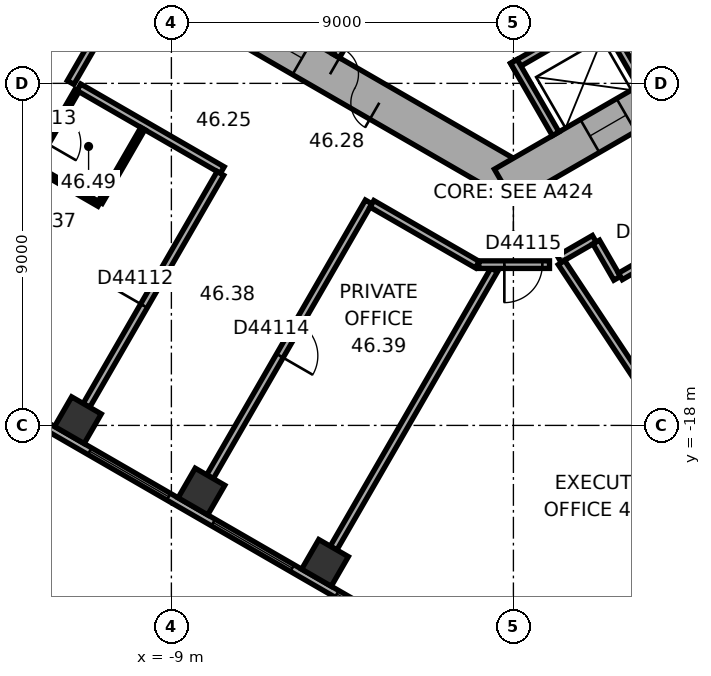
"""IFC4 building model, lengths in metres.
Left out: names, types, materials, properties, quantities, classifications, styles, units other than length and angle.
Written with IfcOpenShell. Run it as: python <this file> out.ifc"""

import sys

from ifc_helpers import new_model, si_unit, direction, frame, frame_2d, origin, origin_2d, place, context, subcontext, project, spatial, rectangle, extrude, element, fill, save


model = new_model("IFC4")
c1 = context("Model", 3, precision=1e-05, world=origin(), true_north=direction((0.0, 1.0)))
c2 = subcontext(c1, "Body", "Model", "MODEL_VIEW")
j1 = project(units=[si_unit("LENGTHUNIT", "METRE"), si_unit("PLANEANGLEUNIT", "RADIAN")], contexts=[c1])
p1 = place(None, origin())
s1 = spatial("IfcSite", under=j1, at=p1, CompositionType="ELEMENT")
p2 = place(p1, origin())
s2 = spatial("IfcBuilding", under=s1, at=p2, CompositionType="ELEMENT")
p3 = place(p2, frame((0.0, 0.0, 187.3)))
s3 = spatial("IfcBuildingStorey", under=s2, at=p3, CompositionType="ELEMENT", Elevation=187.3)
for number, where, z_axis, x_axis in (
    (1, (-11.46, -17.863, 0.0), (0.0, 0.0, 1.0), (0.866, -0.5, 0.0)),
    (2, (-8.208, -19.74, 0.0), (0.0, 0.0, 1.0), (0.866, -0.5, 0.0)),
    (3, (-4.958, -21.617, 0.0), (0.0, 0.0, 1.0), (0.866, -0.5, 0.0)),
):
    element("IfcColumn", number, at=place(p3, frame(where, z_axis=z_axis, x_axis=x_axis)), inside=s3, PredefinedType="COLUMN", context=c2, shape_type="SweptSolid", body=[
        extrude(rectangle(XDim=0.9, YDim=0.9, at=origin_2d()), origin(), (0.0, 0.0, 1.0), 3.7),
    ])
p4 = place(p3, frame((-10.25, -5.629, 0.0), z_axis=(0.0, 0.0, 1.0), x_axis=(0.866022616891, -0.50000482701, 0.0)))
e4 = element("IfcWall", 4, at=p4, inside=s3, PredefinedType="SHEAR", context=c2, shape_type="SweptSolid", body=[
    extrude(rectangle(XDim=12.125, YDim=1.0, at=frame_2d((6.062, 0.0))), origin(), (0.0, 0.0, 1.0), 3.7),
])
p5 = place(p4, frame((6.262, 0.0, 0.0)))
e5 = element("IfcOpeningElement", 5, at=p5, cuts=e4, PredefinedType="OPENING", context=c2, shape_type="SweptSolid", body=[
    extrude(rectangle(XDim=1.5, YDim=2.1, at=frame_2d((0.75, 1.05))), frame((0.0, 0.51, 0.0), z_axis=(0.0, -1.0, 0.0), x_axis=(1.0, 0.0, 0.0)), (0.0, 0.0, 1.0), 1.02),
])
p6 = place(p4, frame((1.712, 0.0, 0.0)))
e6 = element("IfcOpeningElement", 6, at=p6, cuts=e4, PredefinedType="OPENING", context=c2, shape_type="SweptSolid", body=[
    extrude(rectangle(XDim=1.1, YDim=2.1, at=frame_2d((0.55, 1.05))), frame((0.0, 0.51, 0.0), z_axis=(0.0, -1.0, 0.0), x_axis=(1.0, 0.0, 0.0)), (0.0, 0.0, 1.0), 1.02),
])
p7 = place(p4, frame((4.312, 0.0, 0.0)))
e7 = element("IfcOpeningElement", 7, at=p7, cuts=e4, PredefinedType="OPENING", context=c2, shape_type="SweptSolid", body=[
    extrude(rectangle(XDim=1.1, YDim=2.1, at=frame_2d((0.55, 1.05))), frame((0.0, 0.51, 0.0), z_axis=(0.0, -1.0, 0.0), x_axis=(1.0, 0.0, 0.0)), (0.0, 0.0, 1.0), 1.02),
])
p8 = place(p3, frame((-0.25, -11.691, 0.0), z_axis=(0.0, 0.0, 1.0), x_axis=(0.866022616891, 0.50000482701, 0.0)))
e8 = element("IfcWall", 8, at=p8, inside=s3, PredefinedType="SHEAR", context=c2, shape_type="SweptSolid", body=[
    extrude(rectangle(XDim=12.125, YDim=1.0, at=frame_2d((6.062, 0.0))), origin(), (0.0, 0.0, 1.0), 3.7),
])
p9 = place(p8, frame((2.612, 0.0, 0.0)))
e9 = element("IfcOpeningElement", 9, at=p9, cuts=e8, PredefinedType="OPENING", context=c2, shape_type="SweptSolid", body=[
    extrude(rectangle(XDim=1.1, YDim=2.1, at=frame_2d((0.55, 1.05))), frame((0.0, 0.51, 0.0), z_axis=(0.0, -1.0, 0.0), x_axis=(1.0, 0.0, 0.0)), (0.0, 0.0, 1.0), 1.02),
])
p10 = place(p8, frame((5.212, 0.0, 0.0)))
e10 = element("IfcOpeningElement", 10, at=p10, cuts=e8, PredefinedType="OPENING", context=c2, shape_type="SweptSolid", body=[
    extrude(rectangle(XDim=1.1, YDim=2.1, at=frame_2d((0.55, 1.05))), frame((0.0, 0.51, 0.0), z_axis=(0.0, -1.0, 0.0), x_axis=(1.0, 0.0, 0.0)), (0.0, 0.0, 1.0), 1.02),
])
p11 = place(p8, frame((7.812, 0.0, 0.0)))
e11 = element("IfcOpeningElement", 11, at=p11, cuts=e8, PredefinedType="OPENING", context=c2, shape_type="SweptSolid", body=[
    extrude(rectangle(XDim=1.1, YDim=2.1, at=frame_2d((0.55, 1.05))), frame((0.0, 0.51, 0.0), z_axis=(0.0, -1.0, 0.0), x_axis=(1.0, 0.0, 0.0)), (0.0, 0.0, 1.0), 1.02),
])
p12 = place(p3, frame((-18.789, -14.267, 0.0), z_axis=(0.0, 0.0, 1.0), x_axis=(0.866023315909, -0.500003616288, 0.0)))
e12 = element("IfcWall", 12, at=p12, inside=s3, PredefinedType="STANDARD", context=c2, shape_type="SweptSolid", body=[
    extrude(rectangle(XDim=20.044, YDim=0.2, at=frame_2d((10.022, 0.0))), origin(), (0.0, 0.0, 1.0), 3.7),
])
p13 = place(p12, frame((1.314, 0.0, 0.9)))
e13 = element("IfcOpeningElement", 13, at=p13, cuts=e12, PredefinedType="OPENING", context=c2, shape_type="SweptSolid", body=[
    extrude(rectangle(XDim=2.4, YDim=2.0, at=frame_2d((1.2, 1.0))), frame((0.0, 0.11, 0.0), z_axis=(0.0, -1.0, 0.0), x_axis=(1.0, 0.0, 0.0)), (0.0, 0.0, 1.0), 0.22),
])
p14 = place(p12, frame((5.069, 0.0, 0.9)))
e14 = element("IfcOpeningElement", 14, at=p14, cuts=e12, PredefinedType="OPENING", context=c2, shape_type="SweptSolid", body=[
    extrude(rectangle(XDim=2.4, YDim=2.0, at=frame_2d((1.2, 1.0))), frame((0.0, 0.11, 0.0), z_axis=(0.0, -1.0, 0.0), x_axis=(1.0, 0.0, 0.0)), (0.0, 0.0, 1.0), 0.22),
])
p15 = place(p12, frame((8.823, 0.0, 0.9)))
e15 = element("IfcOpeningElement", 15, at=p15, cuts=e12, PredefinedType="OPENING", context=c2, shape_type="SweptSolid", body=[
    extrude(rectangle(XDim=2.4, YDim=2.0, at=frame_2d((1.2, 1.0))), frame((0.0, 0.11, 0.0), z_axis=(0.0, -1.0, 0.0), x_axis=(1.0, 0.0, 0.0)), (0.0, 0.0, 1.0), 0.22),
])
p16 = place(p12, frame((12.577, 0.0, 0.9)))
e16 = element("IfcOpeningElement", 16, at=p16, cuts=e12, PredefinedType="OPENING", context=c2, shape_type="SweptSolid", body=[
    extrude(rectangle(XDim=2.4, YDim=2.0, at=frame_2d((1.2, 1.0))), frame((0.0, 0.11, 0.0), z_axis=(0.0, -1.0, 0.0), x_axis=(1.0, 0.0, 0.0)), (0.0, 0.0, 1.0), 0.22),
])
p17 = place(p12, frame((16.331, 0.0, 0.9)))
e17 = element("IfcOpeningElement", 17, at=p17, cuts=e12, PredefinedType="OPENING", context=c2, shape_type="SweptSolid", body=[
    extrude(rectangle(XDim=2.4, YDim=2.0, at=frame_2d((1.2, 1.0))), frame((0.0, 0.11, 0.0), z_axis=(0.0, -1.0, 0.0), x_axis=(1.0, 0.0, 0.0)), (0.0, 0.0, 1.0), 0.22),
])
p18 = place(p3, frame((2.911, -24.156, 0.0), z_axis=(0.0, 0.0, 1.0), x_axis=(0.833882163564, 0.551942512668, 0.0)))
e18 = element("IfcWall", 18, at=p18, inside=s3, PredefinedType="STANDARD", context=c2, shape_type="SweptSolid", body=[
    extrude(rectangle(XDim=20.044, YDim=0.2, at=frame_2d((10.022, 0.0))), origin(), (0.0, 0.0, 1.0), 3.7),
])
p19 = place(p18, frame((1.313, 0.0, 0.9)))
e19 = element("IfcOpeningElement", 19, at=p19, cuts=e18, PredefinedType="OPENING", context=c2, shape_type="SweptSolid", body=[
    extrude(rectangle(XDim=2.4, YDim=2.0, at=frame_2d((1.2, 1.0))), frame((0.0, 0.11, 0.0), z_axis=(0.0, -1.0, 0.0), x_axis=(1.0, 0.0, 0.0)), (0.0, 0.0, 1.0), 0.22),
])
p20 = place(p18, frame((5.067, 0.0, 0.9)))
e20 = element("IfcOpeningElement", 20, at=p20, cuts=e18, PredefinedType="OPENING", context=c2, shape_type="SweptSolid", body=[
    extrude(rectangle(XDim=2.4, YDim=2.0, at=frame_2d((1.2, 1.0))), frame((0.0, 0.11, 0.0), z_axis=(0.0, -1.0, 0.0), x_axis=(1.0, 0.0, 0.0)), (0.0, 0.0, 1.0), 0.22),
])
p21 = place(p18, frame((8.821, 0.0, 0.9)))
e21 = element("IfcOpeningElement", 21, at=p21, cuts=e18, PredefinedType="OPENING", context=c2, shape_type="SweptSolid", body=[
    extrude(rectangle(XDim=2.4, YDim=2.0, at=frame_2d((1.2, 1.0))), frame((0.0, 0.11, 0.0), z_axis=(0.0, -1.0, 0.0), x_axis=(1.0, 0.0, 0.0)), (0.0, 0.0, 1.0), 0.22),
])
p22 = place(p18, frame((12.575, 0.0, 0.9)))
e22 = element("IfcOpeningElement", 22, at=p22, cuts=e18, PredefinedType="OPENING", context=c2, shape_type="SweptSolid", body=[
    extrude(rectangle(XDim=2.4, YDim=2.0, at=frame_2d((1.2, 1.0))), frame((0.0, 0.11, 0.0), z_axis=(0.0, -1.0, 0.0), x_axis=(1.0, 0.0, 0.0)), (0.0, 0.0, 1.0), 0.22),
])
p23 = place(p18, frame((16.329, 0.0, 0.9)))
e23 = element("IfcOpeningElement", 23, at=p23, cuts=e18, PredefinedType="OPENING", context=c2, shape_type="SweptSolid", body=[
    extrude(rectangle(XDim=2.4, YDim=2.0, at=frame_2d((1.2, 1.0))), frame((0.0, 0.11, 0.0), z_axis=(0.0, -1.0, 0.0), x_axis=(1.0, 0.0, 0.0)), (0.0, 0.0, 1.0), 0.22),
])
p24 = place(p3, frame((-3.563, -6.372, 0.0), z_axis=(0.0, 0.0, 1.0), x_axis=(-0.499994660107, -0.866028486751, 0.0)))
e24 = element("IfcWall", 24, at=p24, inside=s3, PredefinedType="PARTITIONING", context=c2, shape_type="SweptSolid", body=[
    extrude(rectangle(XDim=2.2, YDim=0.2, at=frame_2d((1.1, 0.0))), origin(), (0.0, 0.0, 1.0), 3.42),
])
p25 = place(p3, frame((-0.024, -8.559, 0.0), z_axis=(0.0, 0.0, 1.0), x_axis=(0.866026010844, 0.49999894854, 0.0)))
e25 = element("IfcWall", 25, at=p25, inside=s3, PredefinedType="PARTITIONING", context=c2, shape_type="SweptSolid", body=[
    extrude(rectangle(XDim=8.0, YDim=0.2, at=frame_2d((4.0, 0.0))), origin(), (0.0, 0.0, 1.0), 3.42),
])
for number, where, z_axis, x_axis in (
    (26, (0.013, -8.422, 0.0), (0.0, 0.0, 1.0), (0.5, -0.866, 0.0)),
    (27, (2.264, -7.122, 0.0), (0.0, 0.0, 1.0), (0.5, -0.866, 0.0)),
):
    element("IfcWall", number, at=place(p3, frame(where, z_axis=z_axis, x_axis=x_axis)), inside=s3, PredefinedType="PARTITIONING", context=c2, shape_type="SweptSolid", body=[
        extrude(rectangle(XDim=2.2, YDim=0.2, at=frame_2d((1.1, 0.0))), origin(), (0.0, 0.0, 1.0), 3.42),
    ])
p26 = place(p3, frame((-12.635, -11.182, 0.0), z_axis=(0.0, 0.0, 1.0), x_axis=(0.499952165731, 0.866053019151, 0.0)))
e28 = element("IfcWall", 28, at=p26, inside=s3, PredefinedType="PARTITIONING", context=c2, shape_type="SweptSolid", body=[
    extrude(rectangle(XDim=2.3, YDim=0.12, at=frame_2d((1.15, 0.0))), origin(), (0.0, 0.0, 1.0), 3.42),
])
p27 = place(p26, frame((0.7, 0.0, 0.0)))
e29 = element("IfcOpeningElement", 29, at=p27, cuts=e28, PredefinedType="OPENING", context=c2, shape_type="SweptSolid", body=[
    extrude(rectangle(XDim=0.9, YDim=2.1, at=frame_2d((0.45, 1.05))), frame((0.0, 0.07, 0.0), z_axis=(0.0, -1.0, 0.0), x_axis=(1.0, 0.0, 0.0)), (0.0, 0.0, 1.0), 0.14),
])
p28 = place(p3, frame((-11.435, -9.103, 0.0), z_axis=(0.0, 0.0, 1.0), x_axis=(0.866007399799, -0.500031182522, 0.0)))
e30 = element("IfcWall", 30, at=p28, inside=s3, PredefinedType="PARTITIONING", context=c2, shape_type="SweptSolid", body=[
    extrude(rectangle(XDim=4.358, YDim=0.2, at=frame_2d((2.179, 0.0))), origin(), (0.0, 0.0, 1.0), 3.42),
])
p29 = place(p3, frame((-11.235, -17.474, 0.0), z_axis=(0.0, 0.0, 1.0), x_axis=(0.500009260695, 0.866020057054, 0.0)))
e31 = element("IfcWall", 31, at=p29, inside=s3, PredefinedType="PARTITIONING", context=c2, shape_type="SweptSolid", body=[
    extrude(rectangle(XDim=7.049, YDim=0.2, at=frame_2d((3.524, 0.0))), origin(), (0.0, 0.0, 1.0), 2.87),
])
p30 = place(p29, frame((3.024, 0.0, 0.0)))
e32 = element("IfcOpeningElement", 32, at=p30, cuts=e31, PredefinedType="OPENING", context=c2, shape_type="SweptSolid", body=[
    extrude(rectangle(XDim=1.0, YDim=2.1, at=frame_2d((0.5, 1.05))), frame((0.0, 0.11, 0.0), z_axis=(0.0, -1.0, 0.0), x_axis=(1.0, 0.0, 0.0)), (0.0, 0.0, 1.0), 0.22),
])
p31 = place(p3, frame((-11.101, -8.025, 0.0), z_axis=(0.0, 0.0, 1.0), x_axis=(-0.500074377092, -0.865982457891, 0.0)))
e33 = element("IfcWall", 33, at=p31, inside=s3, PredefinedType="PARTITIONING", context=c2, shape_type="SweptSolid", body=[
    extrude(rectangle(XDim=1.101, YDim=0.2, at=frame_2d((0.55, 0.0))), origin(), (0.0, 0.0, 1.0), 3.42),
])
p32 = place(p3, frame((-10.903, -12.182, 0.0), z_axis=(0.0, 0.0, 1.0), x_axis=(-0.866011626733, 0.500023861795, 0.0)))
e34 = element("IfcWall", 34, at=p32, inside=s3, PredefinedType="PARTITIONING", context=c2, shape_type="SweptSolid", body=[
    extrude(rectangle(XDim=1.94, YDim=0.12, at=frame_2d((0.97, 0.0))), origin(), (0.0, 0.0, 1.0), 3.42),
])
p33 = place(p3, frame((-9.753, -10.19, 0.0), z_axis=(0.0, 0.0, 1.0), x_axis=(-0.49994888933, -0.866054910533, 0.0)))
e35 = element("IfcWall", 35, at=p33, inside=s3, PredefinedType="PARTITIONING", context=c2, shape_type="SweptSolid", body=[
    extrude(rectangle(XDim=2.24, YDim=0.12, at=frame_2d((1.12, 0.0))), origin(), (0.0, 0.0, 1.0), 3.42),
])
p34 = place(p3, frame((-7.984, -19.351, 0.0), z_axis=(0.0, 0.0, 1.0), x_axis=(0.500010139422, 0.866019549707, 0.0)))
e36 = element("IfcWall", 36, at=p34, inside=s3, PredefinedType="PARTITIONING", context=c2, shape_type="SweptSolid", body=[
    extrude(rectangle(XDim=8.35, YDim=0.2, at=frame_2d((4.175, 0.0))), origin(), (0.0, 0.0, 1.0), 3.42),
])
p35 = place(p34, frame((3.675, 0.0, 0.0)))
e37 = element("IfcOpeningElement", 37, at=p35, cuts=e36, PredefinedType="OPENING", context=c2, shape_type="SweptSolid", body=[
    extrude(rectangle(XDim=1.0, YDim=2.1, at=frame_2d((0.5, 1.05))), frame((0.0, 0.11, 0.0), z_axis=(0.0, -1.0, 0.0), x_axis=(1.0, 0.0, 0.0)), (0.0, 0.0, 1.0), 0.22),
])
p36 = place(p3, frame((-4.732, -21.228, 0.0), z_axis=(0.0, 0.0, 1.0), x_axis=(0.500000843414, 0.866024916838, 0.0)))
e38 = element("IfcWall", 38, at=p36, inside=s3, PredefinedType="PARTITIONING", context=c2, shape_type="SweptSolid", body=[
    extrude(rectangle(XDim=8.452, YDim=0.2, at=frame_2d((4.226, 0.0))), origin(), (0.0, 0.0, 1.0), 3.42),
])
p37 = place(p3, frame((-3.722, -12.169, 0.0), z_axis=(0.0, 0.0, 1.0), x_axis=(0.866033163891, -0.499986558861, 0.0)))
e39 = element("IfcWall", 39, at=p37, inside=s3, PredefinedType="PARTITIONING", context=c2, shape_type="SweptSolid", body=[
    extrude(rectangle(XDim=3.201, YDim=0.2, at=frame_2d((1.6, 0.0))), origin(), (0.0, 0.0, 1.0), 3.42),
])
p38 = place(p3, frame((-0.91, -13.77, 0.0), z_axis=(0.0, 0.0, 1.0), x_axis=(1.0, 0.0, 0.0)))
e40 = element("IfcWall", 40, at=p38, inside=s3, PredefinedType="PARTITIONING", context=c2, shape_type="SweptSolid", body=[
    extrude(rectangle(XDim=1.86, YDim=0.2, at=frame_2d((0.93, 0.0))), origin(), (0.0, 0.0, 1.0), 3.42),
])
p39 = place(p38, frame((0.672, 0.0, 0.0)))
e41 = element("IfcOpeningElement", 41, at=p39, cuts=e40, PredefinedType="OPENING", context=c2, shape_type="SweptSolid", body=[
    extrude(rectangle(XDim=1.0, YDim=2.1, at=frame_2d((0.5, 1.05))), frame((0.0, 0.11, 0.0), z_axis=(0.0, -1.0, 0.0), x_axis=(1.0, 0.0, 0.0)), (0.0, 0.0, 1.0), 0.22),
])
p40 = place(p3, frame((1.204, -13.623, 0.0), z_axis=(0.0, 0.0, 1.0), x_axis=(0.866040989419, 0.499973003918, 0.0)))
e42 = element("IfcWall", 42, at=p40, inside=s3, PredefinedType="PARTITIONING", context=c2, shape_type="SweptSolid", body=[
    extrude(rectangle(XDim=1.068, YDim=0.2, at=frame_2d((0.534, 0.0))), origin(), (0.0, 0.0, 1.0), 3.42),
])
p41 = place(p3, frame((2.179, -13.176, 0.0), z_axis=(0.0, 0.0, 1.0), x_axis=(0.499978356969, -0.866037899034, 0.0)))
e43 = element("IfcWall", 43, at=p41, inside=s3, PredefinedType="PARTITIONING", context=c2, shape_type="SweptSolid", body=[
    extrude(rectangle(XDim=1.101, YDim=0.2, at=frame_2d((0.551, 0.0))), origin(), (0.0, 0.0, 1.0), 3.42),
])
p42 = place(p3, frame((2.816, -14.079, 0.0), z_axis=(0.0, 0.0, 1.0), x_axis=(0.866008705299, 0.50002892151, 0.0)))
e44 = element("IfcWall", 44, at=p42, inside=s3, PredefinedType="PARTITIONING", context=c2, shape_type="SweptSolid", body=[
    extrude(rectangle(XDim=2.666, YDim=0.2, at=frame_2d((1.333, 0.0))), origin(), (0.0, 0.0, 1.0), 3.42),
])
p43 = place(p42, frame((0.833, 0.0, 0.0)))
e45 = element("IfcOpeningElement", 45, at=p43, cuts=e44, PredefinedType="OPENING", context=c2, shape_type="SweptSolid", body=[
    extrude(rectangle(XDim=1.0, YDim=2.1, at=frame_2d((0.5, 1.05))), frame((0.0, 0.11, 0.0), z_axis=(0.0, -1.0, 0.0), x_axis=(1.0, 0.0, 0.0)), (0.0, 0.0, 1.0), 0.22),
])
p44 = place(p3, frame((6.02, -20.899, 0.0), z_axis=(0.0, 0.0, 1.0), x_axis=(-0.551943990108, 0.833881185651, 0.0)))
e46 = element("IfcWall", 46, at=p44, inside=s3, PredefinedType="PARTITIONING", context=c2, shape_type="SweptSolid", body=[
    extrude(rectangle(XDim=8.615, YDim=0.2, at=frame_2d((4.308, 0.0))), origin(), (0.0, 0.0, 1.0), 3.42),
])
p45 = place(p15, origin())
e47 = element("IfcWindow", 47, at=p45, inside=s3, PartitioningType="SINGLE_PANEL", PredefinedType="WINDOW", context=c2, shape_type="SweptSolid", body=[
    extrude(rectangle(XDim=2.4, YDim=2.0, at=frame_2d((1.2, 1.0))), frame((0.0, 0.03, 0.0), z_axis=(0.0, -1.0, 0.0), x_axis=(1.0, 0.0, 0.0)), (0.0, 0.0, 1.0), 0.06),
])
fill(e15, e47)
p46 = place(p16, origin())
e48 = element("IfcWindow", 48, at=p46, inside=s3, PartitioningType="SINGLE_PANEL", PredefinedType="WINDOW", context=c2, shape_type="SweptSolid", body=[
    extrude(rectangle(XDim=2.4, YDim=2.0, at=frame_2d((1.2, 1.0))), frame((0.0, 0.03, 0.0), z_axis=(0.0, -1.0, 0.0), x_axis=(1.0, 0.0, 0.0)), (0.0, 0.0, 1.0), 0.06),
])
fill(e16, e48)
p47 = place(p17, origin())
e49 = element("IfcWindow", 49, at=p47, inside=s3, PartitioningType="SINGLE_PANEL", PredefinedType="WINDOW", context=c2, shape_type="SweptSolid", body=[
    extrude(rectangle(XDim=2.4, YDim=2.0, at=frame_2d((1.2, 1.0))), frame((0.0, 0.03, 0.0), z_axis=(0.0, -1.0, 0.0), x_axis=(1.0, 0.0, 0.0)), (0.0, 0.0, 1.0), 0.06),
])
fill(e17, e49)
p48 = place(p5, origin())
e50 = element("IfcDoor", 50, at=p48, inside=s3, OperationType="DOUBLE_DOOR_SINGLE_SWING", PredefinedType="DOOR", context=c2, shape_type="SweptSolid", body=[
    extrude(rectangle(XDim=1.5, YDim=2.1, at=frame_2d((0.75, 1.05))), frame((0.0, 0.025, 0.0), z_axis=(0.0, -1.0, 0.0), x_axis=(1.0, 0.0, 0.0)), (0.0, 0.0, 1.0), 0.05),
])
fill(e5, e50)
p49 = place(p7, origin())
e51 = element("IfcDoor", 51, at=p49, inside=s3, OperationType="DOUBLE_DOOR_SLIDING", PredefinedType="DOOR", context=c2, shape_type="SweptSolid", body=[
    extrude(rectangle(XDim=1.1, YDim=2.1, at=frame_2d((0.55, 1.05))), frame((0.0, 0.025, 0.0), z_axis=(0.0, -1.0, 0.0), x_axis=(1.0, 0.0, 0.0)), (0.0, 0.0, 1.0), 0.05),
])
fill(e7, e51)
p50 = place(p9, origin())
e52 = element("IfcDoor", 52, at=p50, inside=s3, OperationType="DOUBLE_DOOR_SLIDING", PredefinedType="DOOR", context=c2, shape_type="SweptSolid", body=[
    extrude(rectangle(XDim=1.1, YDim=2.1, at=frame_2d((0.55, 1.05))), frame((0.0, 0.025, 0.0), z_axis=(0.0, -1.0, 0.0), x_axis=(1.0, 0.0, 0.0)), (0.0, 0.0, 1.0), 0.05),
])
fill(e9, e52)
p51 = place(p30, origin())
e53 = element("IfcDoor", 53, at=p51, inside=s3, OperationType="SINGLE_SWING_LEFT", PredefinedType="DOOR", context=c2, shape_type="SweptSolid", body=[
    extrude(rectangle(XDim=1.0, YDim=2.1, at=frame_2d((0.5, 1.05))), frame((0.0, 0.025, 0.0), z_axis=(0.0, -1.0, 0.0), x_axis=(1.0, 0.0, 0.0)), (0.0, 0.0, 1.0), 0.05),
])
fill(e32, e53)
p52 = place(p27, origin())
e54 = element("IfcDoor", 54, at=p52, inside=s3, OperationType="SINGLE_SWING_LEFT", PredefinedType="DOOR", context=c2, shape_type="SweptSolid", body=[
    extrude(rectangle(XDim=0.9, YDim=2.1, at=frame_2d((0.45, 1.05))), frame((0.0, 0.025, 0.0), z_axis=(0.0, -1.0, 0.0), x_axis=(1.0, 0.0, 0.0)), (0.0, 0.0, 1.0), 0.05),
])
fill(e29, e54)
p53 = place(p35, origin())
e55 = element("IfcDoor", 55, at=p53, inside=s3, OperationType="SINGLE_SWING_LEFT", PredefinedType="DOOR", context=c2, shape_type="SweptSolid", body=[
    extrude(rectangle(XDim=1.0, YDim=2.1, at=frame_2d((0.5, 1.05))), frame((0.0, 0.025, 0.0), z_axis=(0.0, -1.0, 0.0), x_axis=(1.0, 0.0, 0.0)), (0.0, 0.0, 1.0), 0.05),
])
fill(e37, e55)
p54 = place(p39, origin())
e56 = element("IfcDoor", 56, at=p54, inside=s3, OperationType="SINGLE_SWING_LEFT", PredefinedType="DOOR", context=c2, shape_type="SweptSolid", body=[
    extrude(rectangle(XDim=1.0, YDim=2.1, at=frame_2d((0.5, 1.05))), frame((0.0, 0.025, 0.0), z_axis=(0.0, -1.0, 0.0), x_axis=(1.0, 0.0, 0.0)), (0.0, 0.0, 1.0), 0.05),
])
fill(e41, e56)
save(model, sys.argv[1])
